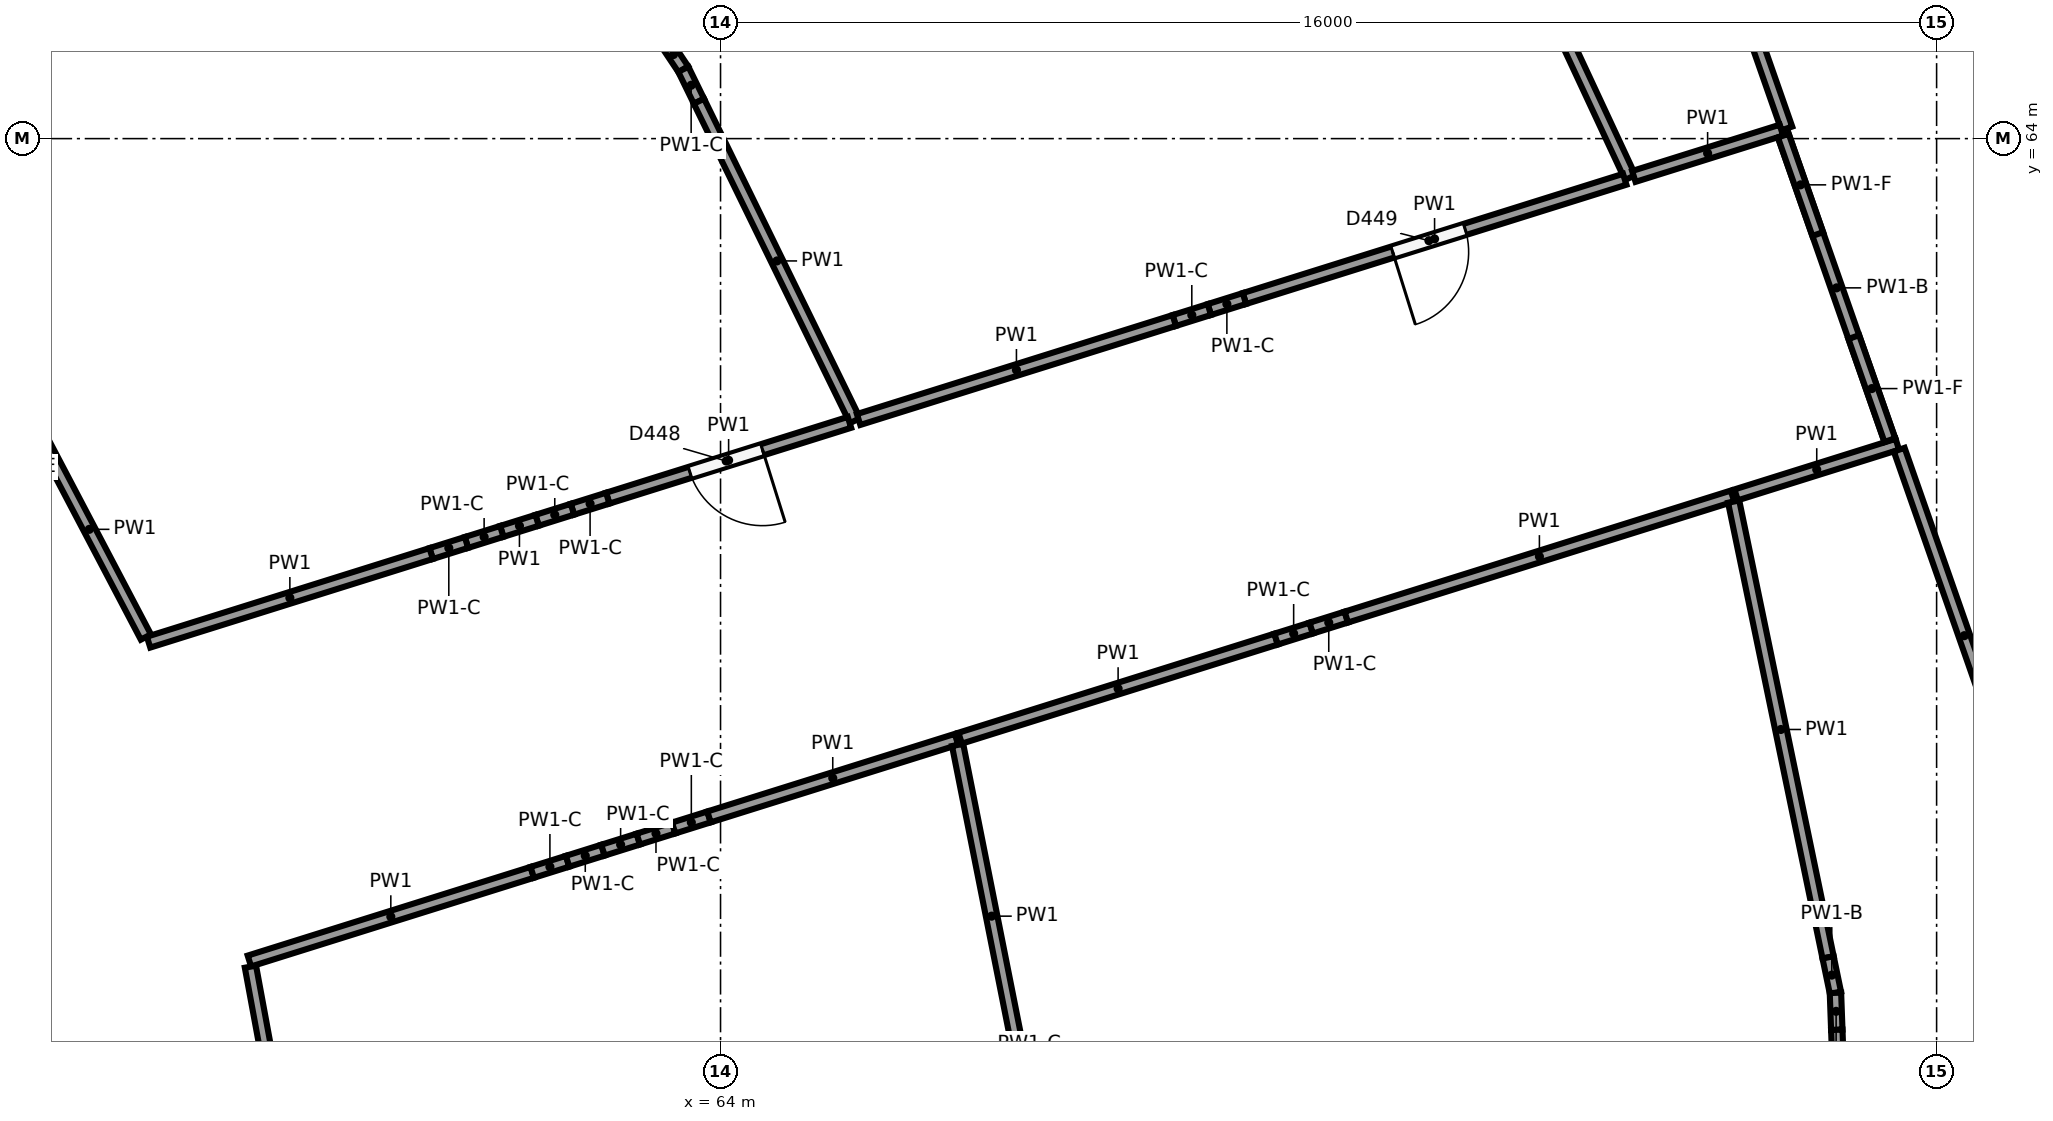
"""IFC4 building model, lengths in metres.
Left out: names, types, materials, properties, quantities, classifications, styles, units other than length and angle.
Written with IfcOpenShell. Run it as: python <this file> out.ifc"""

import sys

from ifc_helpers import new_model, si_unit, direction, frame, frame_2d, origin, origin_2d, place, context, subcontext, project, spatial, rectangle, circle, extrude, element, fill, save


model = new_model("IFC4")
c1 = context("Model", 3, precision=1e-05, world=origin(), true_north=direction((0.0, 1.0)))
c2 = subcontext(c1, "Body", "Model", "MODEL_VIEW")
j1 = project(units=[si_unit("LENGTHUNIT", "METRE"), si_unit("PLANEANGLEUNIT", "RADIAN")], contexts=[c1])
p1 = place(None, origin())
s1 = spatial("IfcSite", under=j1, at=p1, CompositionType="ELEMENT")
p2 = place(p1, origin())
s2 = spatial("IfcBuilding", under=s1, at=p2, CompositionType="ELEMENT")
p3 = place(p2, frame((0.0, 0.0, -4.0)))
s3 = spatial("IfcBuildingStorey", under=s2, at=p3, CompositionType="ELEMENT", Elevation=-4.0)
for number, where, z_axis, x_axis in (
    (1, (72.992, 51.847, -0.4), (0.0, 0.0, 1.0), (1.0, 0.0, 0.0)),
    (2, (56.761, 55.16, -0.4), (0.0, 0.0, 1.0), (1.0, 0.0, 0.0)),
    (3, (61.723, 56.716, -0.4), (0.0, 0.0, 1.0), (1.0, 0.0, 0.0)),
):
    element("IfcColumn", number, at=place(p3, frame(where, z_axis=z_axis, x_axis=x_axis)), inside=s3, PredefinedType="COLUMN", context=c2, shape_type="SweptSolid", body=[
        extrude(circle(Radius=0.45, at=origin_2d()), origin(), (0.0, 0.0, 1.0), 4.4),
    ])
p4 = place(p3, frame((62.964, 57.104, -0.4), z_axis=(0.0, 0.0, 1.0), x_axis=(1.0, 0.0, 0.0)))
e4 = element("IfcColumn", 4, at=p4, inside=s3, PredefinedType="COLUMN", context=c2, shape_type="SweptSolid", body=[
    extrude(circle(Radius=0.4, at=origin_2d()), origin(), (0.0, 0.0, 1.0), 4.4),
])
for number, where, z_axis, x_axis in (
    (5, (71.17, 59.677, -0.4), (0.0, 0.0, 1.0), (1.0, 0.0, 0.0)),
    (6, (59.049, 62.766, -0.4), (0.0, 0.0, 1.0), (1.0, 0.0, 0.0)),
):
    element("IfcColumn", number, at=place(p3, frame(where, z_axis=z_axis, x_axis=x_axis)), inside=s3, PredefinedType="COLUMN", context=c2, shape_type="SweptSolid", body=[
        extrude(circle(Radius=0.45, at=origin_2d()), origin(), (0.0, 0.0, 1.0), 4.4),
    ])
p5 = place(p3, frame((60.222, 63.331, -0.4), z_axis=(0.0, 0.0, 1.0), x_axis=(1.0, 0.0, 0.0)))
e7 = element("IfcColumn", 7, at=p5, inside=s3, PredefinedType="COLUMN", context=c2, shape_type="SweptSolid", body=[
    extrude(circle(Radius=0.4, at=origin_2d()), origin(), (0.0, 0.0, 1.0), 4.4),
])
p6 = place(p3, frame((57.801, 53.18, 0.0), z_axis=(0.0, 0.0, 1.0), x_axis=(0.954202212312, 0.299162394059, 0.0)))
e8 = element("IfcWall", 8, at=p6, inside=s3, PredefinedType="PARTITIONING", context=c2, shape_type="SweptSolid", body=[
    extrude(rectangle(XDim=3.9, YDim=0.15, at=frame_2d((1.95, 0.0))), origin(), (0.0, 0.0, 1.0), 3.6),
])
p7 = place(p3, frame((61.523, 54.347, 0.0), z_axis=(0.0, 0.0, 1.0), x_axis=(0.954095987043, 0.299500997508, 0.0)))
e9 = element("IfcWall", 9, at=p7, inside=s3, PredefinedType="PARTITIONING", context=c2, shape_type="SweptSolid", body=[
    extrude(rectangle(XDim=0.488, YDim=0.15, at=frame_2d((0.244, 0.0))), origin(), (0.0, 0.0, 1.0), 2.7),
])
p8 = place(p3, frame((61.988, 54.493, 0.0), z_axis=(0.0, 0.0, 1.0), x_axis=(0.954239015287, 0.299044982743, 0.0)))
e10 = element("IfcWall", 10, at=p8, inside=s3, PredefinedType="PARTITIONING", context=c2, shape_type="SweptSolid", body=[
    extrude(rectangle(XDim=0.487, YDim=0.15, at=frame_2d((0.244, 0.0))), origin(), (0.0, 0.0, 1.0), 2.7),
])
for number, where, z_axis, x_axis in (
    (11, (62.453, 54.639, 0.0), (0.0, 0.0, 1.0), (0.954, 0.299, 0.0)),
    (12, (62.918, 54.784, 0.0), (0.0, 0.0, 1.0), (0.954, 0.3, 0.0)),
):
    element("IfcWall", number, at=place(p3, frame(where, z_axis=z_axis, x_axis=x_axis)), inside=s3, PredefinedType="PARTITIONING", context=c2, shape_type="SweptSolid", body=[
        extrude(rectangle(XDim=0.488, YDim=0.15, at=frame_2d((0.244, 0.0))), origin(), (0.0, 0.0, 1.0), 2.7),
    ])
p9 = place(p3, frame((63.383, 54.93, 0.0), z_axis=(0.0, 0.0, 1.0), x_axis=(0.954239015287, 0.299044982743, 0.0)))
e13 = element("IfcWall", 13, at=p9, inside=s3, PredefinedType="PARTITIONING", context=c2, shape_type="SweptSolid", body=[
    extrude(rectangle(XDim=0.487, YDim=0.15, at=frame_2d((0.244, 0.0))), origin(), (0.0, 0.0, 1.0), 2.7),
])
p10 = place(p3, frame((63.848, 55.076, 0.0), z_axis=(0.0, 0.0, 1.0), x_axis=(0.954190550933, 0.299199586414, 0.0)))
e14 = element("IfcWall", 14, at=p10, inside=s3, PredefinedType="PARTITIONING", context=c2, shape_type="SweptSolid", body=[
    extrude(rectangle(XDim=3.412, YDim=0.15, at=frame_2d((1.706, 0.0))), origin(), (0.0, 0.0, 1.0), 3.6),
])
p11 = place(p3, frame((67.119, 56.023, 0.0), z_axis=(0.0, 0.0, 1.0), x_axis=(0.194807566784, -0.980841481547, 0.0)))
e15 = element("IfcWall", 15, at=p11, inside=s3, PredefinedType="PARTITIONING", context=c2, shape_type="SweptSolid", body=[
    extrude(rectangle(XDim=4.593, YDim=0.15, at=frame_2d((2.296, 0.0))), origin(), (0.0, 0.0, 1.0), 3.6),
])
p12 = place(p3, frame((58.395, 49.969, 0.0), z_axis=(0.0, 0.0, 1.0), x_axis=(-0.18165904476, 0.983361577171, 0.0)))
e16 = element("IfcWall", 16, at=p12, inside=s3, PredefinedType="PARTITIONING", context=c2, shape_type="SweptSolid", body=[
    extrude(rectangle(XDim=3.19, YDim=0.15, at=frame_2d((1.595, 0.0))), origin(), (0.0, 0.0, 1.0), 3.6),
])
p13 = place(p3, frame((67.152, 56.112, 0.0), z_axis=(0.0, 0.0, 1.0), x_axis=(0.954196372084, 0.299181021292, 0.0)))
e17 = element("IfcWall", 17, at=p13, inside=s3, PredefinedType="PARTITIONING", context=c2, shape_type="SweptSolid", body=[
    extrude(rectangle(XDim=4.357, YDim=0.15, at=frame_2d((2.178, 0.0))), origin(), (0.0, 0.0, 1.0), 3.6),
])
for number, where, z_axis, x_axis in (
    (18, (71.31, 57.416, 0.0), (0.0, 0.0, 1.0), (0.954, 0.299, 0.0)),
    (19, (71.771, 57.56, 0.0), (0.0, 0.0, 1.0), (0.954, 0.299, 0.0)),
):
    element("IfcWall", number, at=place(p3, frame(where, z_axis=z_axis, x_axis=x_axis)), inside=s3, PredefinedType="PARTITIONING", context=c2, shape_type="SweptSolid", body=[
        extrude(rectangle(XDim=0.484, YDim=0.15, at=frame_2d((0.242, 0.0))), origin(), (0.0, 0.0, 1.0), 2.7),
    ])
p14 = place(p3, frame((72.233, 57.705, 0.0), z_axis=(0.0, 0.0, 1.0), x_axis=(0.954189100371, 0.299204212426, 0.0)))
e20 = element("IfcWall", 20, at=p14, inside=s3, PredefinedType="PARTITIONING", context=c2, shape_type="SweptSolid", body=[
    extrude(rectangle(XDim=5.325, YDim=0.15, at=frame_2d((2.663, 0.0))), origin(), (0.0, 0.0, 1.0), 3.6),
])
p15 = place(p3, frame((77.33, 59.225, 0.0), z_axis=(0.0, 0.0, 1.0), x_axis=(0.20289695764, -0.979200094251, 0.0)))
e21 = element("IfcWall", 21, at=p15, inside=s3, PredefinedType="PARTITIONING", context=c2, shape_type="SweptSolid", body=[
    extrude(rectangle(XDim=6.124, YDim=0.15, at=frame_2d((3.062, 0.0))), origin(), (0.0, 0.0, 1.0), 3.6),
])
p16 = place(p3, frame((78.572, 53.229, 0.0), z_axis=(0.0, 0.0, 1.0), x_axis=(0.20270716315, -0.979239401785, 0.0)))
e22 = element("IfcWall", 22, at=p16, inside=s3, PredefinedType="PARTITIONING", context=c2, shape_type="SweptSolid", body=[
    extrude(rectangle(XDim=0.477, YDim=0.15, at=frame_2d((0.239, 0.0))), origin(), (0.0, 0.0, 1.0), 2.5),
])
p17 = place(p3, frame((78.669, 52.761, 0.0), z_axis=(0.0, 0.0, 1.0), x_axis=(0.036622003428, -0.999329189439, 0.0)))
e23 = element("IfcWall", 23, at=p17, inside=s3, PredefinedType="PARTITIONING", context=c2, shape_type="SweptSolid", body=[
    extrude(rectangle(XDim=0.487, YDim=0.15, at=frame_2d((0.243, 0.0))), origin(), (0.0, 0.0, 1.0), 2.5),
])
p18 = place(p3, frame((78.687, 52.275, 0.0), z_axis=(0.0, 0.0, 1.0), x_axis=(0.036317977956, -0.999340284626, 0.0)))
e24 = element("IfcWall", 24, at=p18, inside=s3, PredefinedType="PARTITIONING", context=c2, shape_type="SweptSolid", body=[
    extrude(rectangle(XDim=7.784, YDim=0.15, at=frame_2d((3.892, 0.0))), origin(), (0.0, 0.0, 1.0), 3.6),
])
p19 = place(p3, frame((77.362, 59.313, 0.0), z_axis=(0.0, 0.0, 1.0), x_axis=(0.954198139725, 0.299175383588, 0.0)))
e25 = element("IfcWall", 25, at=p19, inside=s3, PredefinedType="PARTITIONING", context=c2, shape_type="SweptSolid", body=[
    extrude(rectangle(XDim=2.223, YDim=0.15, at=frame_2d((1.111, 0.0))), origin(), (0.0, 0.0, 1.0), 3.6),
])
p20 = place(p3, frame((79.508, 59.907, 0.0), z_axis=(0.0, 0.0, 1.0), x_axis=(0.330291692253, -0.943878910681, 0.0)))
e26 = element("IfcWall", 26, at=p20, inside=s3, PredefinedType="PARTITIONING", context=c2, shape_type="SweptSolid", body=[
    extrude(rectangle(XDim=5.185, YDim=0.15, at=frame_2d((2.592, 0.0))), origin(), (0.0, 0.0, 1.0), 3.6),
])
p21 = place(p3, frame((52.582, 63.737, 0.0), z_axis=(0.0, 0.0, 1.0), x_axis=(0.82882615394, 0.559506216718, 0.0)))
e27 = element("IfcWall", 27, at=p21, inside=s3, PredefinedType="PARTITIONING", context=c2, shape_type="SweptSolid", body=[
    extrude(rectangle(XDim=3.896, YDim=0.15, at=frame_2d((1.948, 0.0))), origin(), (0.0, 0.0, 1.0), 3.6),
])
p22 = place(p3, frame((63.251, 65.301, 0.0), z_axis=(0.0, 0.0, 1.0), x_axis=(0.555302810798, -0.831648235927, 0.0)))
e28 = element("IfcWall", 28, at=p22, inside=s3, PredefinedType="PARTITIONING", context=c2, shape_type="SweptSolid", body=[
    extrude(rectangle(XDim=0.467, YDim=0.15, at=frame_2d((0.234, 0.0))), origin(), (0.0, 0.0, 1.0), 2.7),
])
p23 = place(p3, frame((63.511, 64.912, 0.0), z_axis=(0.0, 0.0, 1.0), x_axis=(0.439050948337, -0.898462166574, 0.0)))
e29 = element("IfcWall", 29, at=p23, inside=s3, PredefinedType="PARTITIONING", context=c2, shape_type="SweptSolid", body=[
    extrude(rectangle(XDim=0.468, YDim=0.15, at=frame_2d((0.234, 0.0))), origin(), (0.0, 0.0, 1.0), 2.7),
])
p24 = place(p3, frame((63.716, 64.492, 0.0), z_axis=(0.0, 0.0, 1.0), x_axis=(0.438947034321, -0.898512938728, 0.0)))
e30 = element("IfcWall", 30, at=p24, inside=s3, PredefinedType="PARTITIONING", context=c2, shape_type="SweptSolid", body=[
    extrude(rectangle(XDim=4.677, YDim=0.15, at=frame_2d((2.338, 0.0))), origin(), (0.0, 0.0, 1.0), 3.6),
])
p25 = place(p3, frame((65.697, 60.267, 0.0), z_axis=(0.0, 0.0, 1.0), x_axis=(-0.95420717929, -0.299146551026, 0.0)))
e31 = element("IfcWall", 31, at=p25, inside=s3, PredefinedType="PARTITIONING", context=c2, shape_type="SweptSolid", body=[
    extrude(rectangle(XDim=3.333, YDim=0.15, at=frame_2d((1.667, 0.0))), origin(), (0.0, 0.0, 1.0), 3.6),
])
p26 = place(p25, frame((1.2, 0.0, 0.0)))
e32 = element("IfcOpeningElement", 32, at=p26, cuts=e31, PredefinedType="OPENING", context=c2, shape_type="SweptSolid", body=[
    extrude(rectangle(XDim=1.0, YDim=2.1, at=frame_2d((0.5, 1.05))), frame((0.0, 0.085, 0.0), z_axis=(0.0, -1.0, 0.0), x_axis=(1.0, 0.0, 0.0)), (0.0, 0.0, 1.0), 0.17),
])
p27 = place(p3, frame((62.516, 59.27, 0.0), z_axis=(0.0, 0.0, 1.0), x_axis=(-0.954194187562, -0.299187988432, 0.0)))
e33 = element("IfcWall", 33, at=p27, inside=s3, PredefinedType="PARTITIONING", context=c2, shape_type="SweptSolid", body=[
    extrude(rectangle(XDim=0.487, YDim=0.15, at=frame_2d((0.244, 0.0))), origin(), (0.0, 0.0, 1.0), 2.7),
])
p28 = place(p3, frame((62.051, 59.124, 0.0), z_axis=(0.0, 0.0, 1.0), x_axis=(-0.954149295482, -0.299331124226, 0.0)))
e34 = element("IfcWall", 34, at=p28, inside=s3, PredefinedType="PARTITIONING", context=c2, shape_type="SweptSolid", body=[
    extrude(rectangle(XDim=0.487, YDim=0.15, at=frame_2d((0.243, 0.0))), origin(), (0.0, 0.0, 1.0), 2.7),
])
p29 = place(p3, frame((61.587, 58.978, 0.0), z_axis=(0.0, 0.0, 1.0), x_axis=(-0.954194187562, -0.299187988432, 0.0)))
e35 = element("IfcWall", 35, at=p29, inside=s3, PredefinedType="PARTITIONING", context=c2, shape_type="SweptSolid", body=[
    extrude(rectangle(XDim=0.487, YDim=0.15, at=frame_2d((0.244, 0.0))), origin(), (0.0, 0.0, 1.0), 3.6),
])
p30 = place(p3, frame((61.122, 58.833, 0.0), z_axis=(0.0, 0.0, 1.0), x_axis=(-0.954292408643, -0.298874553627, 0.0)))
e36 = element("IfcWall", 36, at=p30, inside=s3, PredefinedType="PARTITIONING", context=c2, shape_type="SweptSolid", body=[
    extrude(rectangle(XDim=0.487, YDim=0.15, at=frame_2d((0.243, 0.0))), origin(), (0.0, 0.0, 1.0), 2.7),
])
p31 = place(p3, frame((60.657, 58.687, 0.0), z_axis=(0.0, 0.0, 1.0), x_axis=(-0.954194187562, -0.299187988432, 0.0)))
e37 = element("IfcWall", 37, at=p31, inside=s3, PredefinedType="PARTITIONING", context=c2, shape_type="SweptSolid", body=[
    extrude(rectangle(XDim=0.487, YDim=0.15, at=frame_2d((0.244, 0.0))), origin(), (0.0, 0.0, 1.0), 2.7),
])
p32 = place(p3, frame((60.192, 58.541, 0.0), z_axis=(0.0, 0.0, 1.0), x_axis=(-0.954184030199, -0.299220381178, 0.0)))
e38 = element("IfcWall", 38, at=p32, inside=s3, PredefinedType="PARTITIONING", context=c2, shape_type="SweptSolid", body=[
    extrude(rectangle(XDim=3.896, YDim=0.15, at=frame_2d((1.948, 0.0))), origin(), (0.0, 0.0, 1.0), 3.6),
])
p33 = place(p3, frame((56.439, 57.443, 0.0), z_axis=(0.0, 0.0, 1.0), x_axis=(-0.465186694802, 0.885212595357, 0.0)))
e39 = element("IfcWall", 39, at=p33, inside=s3, PredefinedType="PARTITIONING", context=c2, shape_type="SweptSolid", body=[
    extrude(rectangle(XDim=3.2, YDim=0.15, at=frame_2d((1.6, 0.0))), origin(), (0.0, 0.0, 1.0), 3.6),
])
p34 = place(p3, frame((73.684, 68.387, 0.0), z_axis=(0.0, 0.0, 1.0), x_axis=(0.42266047211, -0.906288102821, 0.0)))
e40 = element("IfcWall", 40, at=p34, inside=s3, PredefinedType="PARTITIONING", context=c2, shape_type="SweptSolid", body=[
    extrude(rectangle(XDim=5.406, YDim=0.15, at=frame_2d((2.703, 0.0))), origin(), (0.0, 0.0, 1.0), 3.6),
])
p35 = place(p3, frame((75.896, 63.465, 0.0), z_axis=(0.0, 0.0, 1.0), x_axis=(-0.954201223615, -0.299165547568, 0.0)))
e41 = element("IfcWall", 41, at=p35, inside=s3, PredefinedType="PARTITIONING", context=c2, shape_type="SweptSolid", body=[
    extrude(rectangle(XDim=5.244, YDim=0.15, at=frame_2d((2.622, 0.0))), origin(), (0.0, 0.0, 1.0), 3.6),
])
p36 = place(p35, frame((2.2, 0.0, 0.0)))
e42 = element("IfcOpeningElement", 42, at=p36, cuts=e41, PredefinedType="OPENING", context=c2, shape_type="SweptSolid", body=[
    extrude(rectangle(XDim=1.0, YDim=2.1, at=frame_2d((0.5, 1.05))), frame((0.0, 0.085, 0.0), z_axis=(0.0, -1.0, 0.0), x_axis=(1.0, 0.0, 0.0)), (0.0, 0.0, 1.0), 0.17),
])
p37 = place(p3, frame((70.893, 61.896, 0.0), z_axis=(0.0, 0.0, 1.0), x_axis=(-0.954092729202, -0.299511375551, 0.0)))
e43 = element("IfcWall", 43, at=p37, inside=s3, PredefinedType="PARTITIONING", context=c2, shape_type="SweptSolid", body=[
    extrude(rectangle(XDim=0.483, YDim=0.15, at=frame_2d((0.242, 0.0))), origin(), (0.0, 0.0, 1.0), 2.7),
])
p38 = place(p3, frame((70.431, 61.751, 0.0), z_axis=(0.0, 0.0, 1.0), x_axis=(-0.954327195445, -0.298763458331, 0.0)))
e44 = element("IfcWall", 44, at=p38, inside=s3, PredefinedType="PARTITIONING", context=c2, shape_type="SweptSolid", body=[
    extrude(rectangle(XDim=0.484, YDim=0.15, at=frame_2d((0.242, 0.0))), origin(), (0.0, 0.0, 1.0), 2.7),
])
p39 = place(p3, frame((69.97, 61.607, 0.0), z_axis=(0.0, 0.0, 1.0), x_axis=(-0.954191084053, -0.299197886211, 0.0)))
e45 = element("IfcWall", 45, at=p39, inside=s3, PredefinedType="PARTITIONING", context=c2, shape_type="SweptSolid", body=[
    extrude(rectangle(XDim=4.353, YDim=0.15, at=frame_2d((2.176, 0.0))), origin(), (0.0, 0.0, 1.0), 3.6),
])
p40 = place(p3, frame((76.688, 67.969, 0.0), z_axis=(0.0, 0.0, 1.0), x_axis=(0.330235334568, -0.943898630046, 0.0)))
e46 = element("IfcWall", 46, at=p40, inside=s3, PredefinedType="PARTITIONING", context=c2, shape_type="SweptSolid", body=[
    extrude(rectangle(XDim=4.063, YDim=0.15, at=frame_2d((2.032, 0.0))), origin(), (0.0, 0.0, 1.0), 3.6),
])
p41 = place(p3, frame((77.958, 64.111, 0.0), z_axis=(0.0, 0.0, 1.0), x_axis=(-0.954206277419, -0.299149427767, 0.0)))
e47 = element("IfcWall", 47, at=p41, inside=s3, PredefinedType="PARTITIONING", context=c2, shape_type="SweptSolid", body=[
    extrude(rectangle(XDim=2.035, YDim=0.15, at=frame_2d((1.017, 0.0))), origin(), (0.0, 0.0, 1.0), 3.6),
])
p42 = place(p3, frame((77.983, 64.039, 0.0), z_axis=(0.0, 0.0, 1.0), x_axis=(0.330276109597, -0.943884363378, 0.0)))
e48 = element("IfcWall", 48, at=p42, inside=s3, PredefinedType="PARTITIONING", context=c2, shape_type="SweptSolid", body=[
    extrude(rectangle(XDim=4.244, YDim=0.15, at=frame_2d((2.122, 0.0))), origin(), (0.0, 0.0, 1.0), 2.5),
])
p43 = place(p3, frame((77.983, 64.039, 2.5), z_axis=(0.0, 0.0, 1.0), x_axis=(0.330231540275, -0.943899957521, 0.0)))
e49 = element("IfcWall", 49, at=p43, inside=s3, PredefinedType="PARTITIONING", context=c2, shape_type="SweptSolid", body=[
    extrude(rectangle(XDim=1.372, YDim=0.15, at=frame_2d((0.686, 0.0))), origin(), (0.0, 0.0, 1.0), 1.1),
])
p44 = place(p3, frame((78.91, 61.389, 2.5), z_axis=(0.0, 0.0, 1.0), x_axis=(0.330221659301, -0.943903414407, 0.0)))
e50 = element("IfcWall", 50, at=p44, inside=s3, PredefinedType="PARTITIONING", context=c2, shape_type="SweptSolid", body=[
    extrude(rectangle(XDim=1.436, YDim=0.15, at=frame_2d((0.718, 0.0))), origin(), (0.0, 0.0, 1.0), 1.1),
])
p45 = place(p26, origin())
e51 = element("IfcDoor", 51, at=p45, inside=s3, OperationType="SINGLE_SWING_LEFT", PredefinedType="DOOR", context=c2, shape_type="SweptSolid", body=[
    extrude(rectangle(XDim=1.0, YDim=2.1, at=frame_2d((0.5, 1.05))), frame((0.0, 0.025, 0.0), z_axis=(0.0, -1.0, 0.0), x_axis=(1.0, 0.0, 0.0)), (0.0, 0.0, 1.0), 0.05),
])
fill(e32, e51)
p46 = place(p36, origin())
e52 = element("IfcDoor", 52, at=p46, inside=s3, OperationType="SINGLE_SWING_RIGHT", PredefinedType="DOOR", context=c2, shape_type="SweptSolid", body=[
    extrude(rectangle(XDim=1.0, YDim=2.1, at=frame_2d((0.5, 1.05))), frame((0.0, 0.025, 0.0), z_axis=(0.0, -1.0, 0.0), x_axis=(1.0, 0.0, 0.0)), (0.0, 0.0, 1.0), 0.05),
])
fill(e42, e52)
save(model, sys.argv[1])
